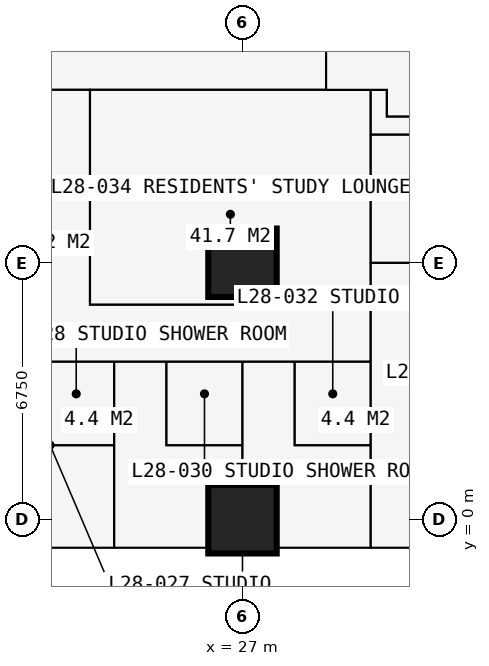
"""IFC4 building model, lengths in metres.
Left out: names, types, materials, properties, quantities, classifications, styles, units other than length and angle.
Written with IfcOpenShell. Run it as: python <this file> out.ifc"""

import sys

from ifc_helpers import new_model, si_unit, direction, frame, frame_2d, origin, origin_2d, place, context, subcontext, project, spatial, rectangle, extrude, element, fill, save


model = new_model("IFC4")
c1 = context("Model", 3, precision=1e-05, world=origin(), true_north=direction((0.0, 1.0)))
c2 = subcontext(c1, "Body", "Model", "MODEL_VIEW")
j1 = project(units=[si_unit("LENGTHUNIT", "METRE"), si_unit("PLANEANGLEUNIT", "RADIAN")], contexts=[c1])
p1 = place(None, origin())
s1 = spatial("IfcSite", under=j1, at=p1, CompositionType="ELEMENT")
p2 = place(p1, origin())
s2 = spatial("IfcBuilding", under=s1, at=p2, CompositionType="ELEMENT")
p3 = place(p2, frame((0.0, 0.0, 105.3)))
s3 = spatial("IfcBuildingStorey", under=s2, at=p3, CompositionType="ELEMENT", Elevation=105.3)
for number, where, z_axis, x_axis in (
    (1, (27.0, 0.0, 0.0), (0.0, 0.0, 1.0), (1.0, 0.0, 0.0)),
    (2, (27.0, 6.75, 0.0), (0.0, 0.0, 1.0), (1.0, 0.0, 0.0)),
):
    element("IfcColumn", number, at=place(p3, frame(where, z_axis=z_axis, x_axis=x_axis)), inside=s3, PredefinedType="COLUMN", context=c2, shape_type="SweptSolid", body=[
        extrude(rectangle(XDim=1.8, YDim=1.8, at=origin_2d()), origin(), (0.0, 0.0, 1.0), 3.6),
    ])
p4 = place(p3, frame((27.0, -0.75, 0.0), z_axis=(0.0, 0.0, 1.0), x_axis=(-1.0, 0.0, 0.0)))
e3 = element("IfcWall", 3, at=p4, inside=s3, PredefinedType="SOLIDWALL", context=c2, shape_type="SweptSolid", body=[
    extrude(rectangle(XDim=6.75, YDim=0.15, at=frame_2d((3.375, 0.0))), origin(), (0.0, 0.0, 1.0), 3.375),
])
p5 = place(p4, frame((0.962, 0.0, 0.0)))
e4 = element("IfcOpeningElement", 4, at=p5, cuts=e3, PredefinedType="OPENING", context=c2, shape_type="SweptSolid", body=[
    extrude(rectangle(XDim=1.0, YDim=2.2, at=frame_2d((0.5, 1.1))), frame((0.0, 0.085, 0.0), z_axis=(0.0, -1.0, 0.0), x_axis=(1.0, 0.0, 0.0)), (0.0, 0.0, 1.0), 0.17),
])
p6 = place(p4, frame((2.025, 0.0, 0.9)))
e5 = element("IfcOpeningElement", 5, at=p6, cuts=e3, PredefinedType="OPENING", context=c2, shape_type="SweptSolid", body=[
    extrude(rectangle(XDim=1.2, YDim=1.8, at=frame_2d((0.6, 0.9))), frame((0.0, 0.085, 0.0), z_axis=(0.0, -1.0, 0.0), x_axis=(1.0, 0.0, 0.0)), (0.0, 0.0, 1.0), 0.17),
])
p7 = place(p4, frame((4.788, 0.0, 0.0)))
e6 = element("IfcOpeningElement", 6, at=p7, cuts=e3, PredefinedType="OPENING", context=c2, shape_type="SweptSolid", body=[
    extrude(rectangle(XDim=1.0, YDim=2.2, at=frame_2d((0.5, 1.1))), frame((0.0, 0.085, 0.0), z_axis=(0.0, -1.0, 0.0), x_axis=(1.0, 0.0, 0.0)), (0.0, 0.0, 1.0), 0.17),
])
p8 = place(p4, frame((3.525, 0.0, 0.9)))
e7 = element("IfcOpeningElement", 7, at=p8, cuts=e3, PredefinedType="OPENING", context=c2, shape_type="SweptSolid", body=[
    extrude(rectangle(XDim=1.2, YDim=1.8, at=frame_2d((0.6, 0.9))), frame((0.0, 0.085, 0.0), z_axis=(0.0, -1.0, 0.0), x_axis=(1.0, 0.0, 0.0)), (0.0, 0.0, 1.0), 0.17),
])
p9 = place(p3, frame((23.625, -0.85, 0.0), z_axis=(0.0, 0.0, 1.0), x_axis=(0.0, -1.0, 0.0)))
e8 = element("IfcWall", 8, at=p9, inside=s3, PredefinedType="USERDEFINED", context=c2, shape_type="SweptSolid", body=[
    extrude(rectangle(XDim=2.2, YDim=1.0, at=frame_2d((1.1, 0.0))), origin(), (0.0, 0.0, 1.0), 0.9),
])
p10 = place(p3, frame((6.75, 4.15, 0.0), z_axis=(0.0, 0.0, 1.0), x_axis=(1.0, 0.0, 0.0)))
e9 = element("IfcWall", 9, at=p10, inside=s3, PredefinedType="PARTITIONING", context=c2, shape_type="SweptSolid", body=[
    extrude(rectangle(XDim=23.625, YDim=0.1, at=frame_2d((11.812, 0.0))), origin(), (0.0, 0.0, 1.0), 3.375),
])
p11 = place(p10, frame((0.2, 0.0, 0.0)))
e10 = element("IfcOpeningElement", 10, at=p11, cuts=e9, PredefinedType="OPENING", context=c2, shape_type="SweptSolid", body=[
    extrude(rectangle(XDim=0.95, YDim=2.2, at=frame_2d((0.475, 1.1))), frame((0.0, 0.06, 0.0), z_axis=(0.0, -1.0, 0.0), x_axis=(1.0, 0.0, 0.0)), (0.0, 0.0, 1.0), 0.12),
])
p12 = place(p10, frame((3.625, 0.0, 0.0)))
e11 = element("IfcOpeningElement", 11, at=p12, cuts=e9, PredefinedType="OPENING", context=c2, shape_type="SweptSolid", body=[
    extrude(rectangle(XDim=0.95, YDim=2.2, at=frame_2d((0.475, 1.1))), frame((0.0, 0.06, 0.0), z_axis=(0.0, -1.0, 0.0), x_axis=(1.0, 0.0, 0.0)), (0.0, 0.0, 1.0), 0.12),
])
p13 = place(p10, frame((6.95, 0.0, 0.0)))
e12 = element("IfcOpeningElement", 12, at=p13, cuts=e9, PredefinedType="OPENING", context=c2, shape_type="SweptSolid", body=[
    extrude(rectangle(XDim=0.95, YDim=2.2, at=frame_2d((0.475, 1.1))), frame((0.0, 0.06, 0.0), z_axis=(0.0, -1.0, 0.0), x_axis=(1.0, 0.0, 0.0)), (0.0, 0.0, 1.0), 0.12),
])
p14 = place(p10, frame((10.375, 0.0, 0.0)))
e13 = element("IfcOpeningElement", 13, at=p14, cuts=e9, PredefinedType="OPENING", context=c2, shape_type="SweptSolid", body=[
    extrude(rectangle(XDim=0.95, YDim=2.2, at=frame_2d((0.475, 1.1))), frame((0.0, 0.06, 0.0), z_axis=(0.0, -1.0, 0.0), x_axis=(1.0, 0.0, 0.0)), (0.0, 0.0, 1.0), 0.12),
])
p15 = place(p10, frame((13.75, 0.0, 0.0)))
e14 = element("IfcOpeningElement", 14, at=p15, cuts=e9, PredefinedType="OPENING", context=c2, shape_type="SweptSolid", body=[
    extrude(rectangle(XDim=0.95, YDim=2.2, at=frame_2d((0.475, 1.1))), frame((0.0, 0.06, 0.0), z_axis=(0.0, -1.0, 0.0), x_axis=(1.0, 0.0, 0.0)), (0.0, 0.0, 1.0), 0.12),
])
p16 = place(p10, frame((17.125, 0.0, 0.0)))
e15 = element("IfcOpeningElement", 15, at=p16, cuts=e9, PredefinedType="OPENING", context=c2, shape_type="SweptSolid", body=[
    extrude(rectangle(XDim=0.95, YDim=2.2, at=frame_2d((0.475, 1.1))), frame((0.0, 0.06, 0.0), z_axis=(0.0, -1.0, 0.0), x_axis=(1.0, 0.0, 0.0)), (0.0, 0.0, 1.0), 0.12),
])
p17 = place(p10, frame((20.5, 0.0, 0.0)))
e16 = element("IfcOpeningElement", 16, at=p17, cuts=e9, PredefinedType="OPENING", context=c2, shape_type="SweptSolid", body=[
    extrude(rectangle(XDim=0.95, YDim=2.2, at=frame_2d((0.475, 1.1))), frame((0.0, 0.06, 0.0), z_axis=(0.0, -1.0, 0.0), x_axis=(1.0, 0.0, 0.0)), (0.0, 0.0, 1.0), 0.12),
])
p18 = place(p3, frame((10.125, 11.3, 0.0), z_axis=(0.0, 0.0, 1.0), x_axis=(1.0, 0.0, 0.0)))
e17 = element("IfcWall", 17, at=p18, inside=s3, PredefinedType="PARTITIONING", context=c2, shape_type="SweptSolid", body=[
    extrude(rectangle(XDim=20.675, YDim=0.15, at=frame_2d((10.337, 0.0))), origin(), (0.0, 0.0, 1.0), 3.375),
])
p19 = place(p18, frame((1.775, 0.0, 0.0)))
e18 = element("IfcOpeningElement", 18, at=p19, cuts=e17, PredefinedType="OPENING", context=c2, shape_type="SweptSolid", body=[
    extrude(rectangle(XDim=1.0, YDim=2.2, at=frame_2d((0.5, 1.1))), frame((0.0, 0.085, 0.0), z_axis=(0.0, -1.0, 0.0), x_axis=(1.0, 0.0, 0.0)), (0.0, 0.0, 1.0), 0.17),
])
p20 = place(p18, frame((11.312, 0.0, 0.0)))
e19 = element("IfcOpeningElement", 19, at=p20, cuts=e17, PredefinedType="OPENING", context=c2, shape_type="SweptSolid", body=[
    extrude(rectangle(XDim=1.0, YDim=2.2, at=frame_2d((0.5, 1.1))), frame((0.0, 0.085, 0.0), z_axis=(0.0, -1.0, 0.0), x_axis=(1.0, 0.0, 0.0)), (0.0, 0.0, 1.0), 0.17),
])
p21 = place(p3, frame((21.625, 1.95, 0.0), z_axis=(0.0, 0.0, 1.0), x_axis=(1.0, 0.0, 0.0)))
e20 = element("IfcWall", 20, at=p21, inside=s3, PredefinedType="PARTITIONING", context=c2, shape_type="SweptSolid", body=[
    extrude(rectangle(XDim=2.0, YDim=0.1, at=frame_2d((1.0, 0.0))), origin(), (0.0, 0.0, 1.0), 3.375),
])
p22 = place(p3, frame((22.988, 5.65, 0.0), z_axis=(0.0, 0.0, 1.0), x_axis=(1.0, 0.0, 0.0)))
e21 = element("IfcWall", 21, at=p22, inside=s3, PredefinedType="PARTITIONING", context=c2, shape_type="SweptSolid", body=[
    extrude(rectangle(XDim=7.387, YDim=0.15, at=frame_2d((3.694, 0.0))), origin(), (0.0, 0.0, 1.0), 3.375),
])
p23 = place(p22, frame((2.15, 0.0, 0.0)))
e22 = element("IfcOpeningElement", 22, at=p23, cuts=e21, PredefinedType="OPENING", context=c2, shape_type="SweptSolid", body=[
    extrude(rectangle(XDim=0.95, YDim=2.2, at=frame_2d((0.475, 1.1))), frame((0.0, 0.085, 0.0), z_axis=(0.0, -1.0, 0.0), x_axis=(1.0, 0.0, 0.0)), (0.0, 0.0, 1.0), 0.17),
])
p24 = place(p3, frame((22.988, 5.65, 0.0), z_axis=(0.0, 0.0, 1.0), x_axis=(0.0, 1.0, 0.0)))
e23 = element("IfcWall", 23, at=p24, inside=s3, PredefinedType="PARTITIONING", context=c2, shape_type="SweptSolid", body=[
    extrude(rectangle(XDim=5.65, YDim=0.15, at=frame_2d((2.825, 0.0))), origin(), (0.0, 0.0, 1.0), 3.375),
])
p25 = place(p3, frame((23.625, -0.734, 0.0), z_axis=(0.0, 0.0, 1.0), x_axis=(0.0, 1.0, 0.0)))
e24 = element("IfcWall", 24, at=p25, inside=s3, PredefinedType="PARTITIONING", context=c2, shape_type="SweptSolid", body=[
    extrude(rectangle(XDim=4.884, YDim=0.175, at=frame_2d((2.442, 0.0))), origin(), (0.0, 0.0, 1.0), 3.375),
])
p26 = place(p3, frame((25.0, 1.95, 0.0), z_axis=(0.0, 0.0, 1.0), x_axis=(0.0, 1.0, 0.0)))
e25 = element("IfcWall", 25, at=p26, inside=s3, PredefinedType="PARTITIONING", context=c2, shape_type="SweptSolid", body=[
    extrude(rectangle(XDim=2.2, YDim=0.1, at=frame_2d((1.1, 0.0))), origin(), (0.0, 0.0, 1.0), 3.375),
])
p27 = place(p26, frame((0.65, 0.0, 0.0)))
e26 = element("IfcOpeningElement", 26, at=p27, cuts=e25, PredefinedType="OPENING", context=c2, shape_type="SweptSolid", body=[
    extrude(rectangle(XDim=0.9, YDim=2.2, at=frame_2d((0.45, 1.1))), frame((0.0, 0.06, 0.0), z_axis=(0.0, -1.0, 0.0), x_axis=(1.0, 0.0, 0.0)), (0.0, 0.0, 1.0), 0.12),
])
p28 = place(p3, frame((25.0, 1.95, 0.0), z_axis=(0.0, 0.0, 1.0), x_axis=(1.0, 0.0, 0.0)))
e27 = element("IfcWall", 27, at=p28, inside=s3, PredefinedType="PARTITIONING", context=c2, shape_type="SweptSolid", body=[
    extrude(rectangle(XDim=2.0, YDim=0.1, at=frame_2d((1.0, 0.0))), origin(), (0.0, 0.0, 1.0), 3.375),
])
p29 = place(p3, frame((27.0, -0.734, 0.0), z_axis=(0.0, 0.0, 1.0), x_axis=(0.0, 1.0, 0.0)))
e28 = element("IfcWall", 28, at=p29, inside=s3, PredefinedType="PARTITIONING", context=c2, shape_type="SweptSolid", body=[
    extrude(rectangle(XDim=4.884, YDim=0.175, at=frame_2d((2.442, 0.0))), origin(), (0.0, 0.0, 1.0), 2.61),
])
p30 = place(p3, frame((28.375, 1.95, 0.0), z_axis=(0.0, 0.0, 1.0), x_axis=(0.0, 1.0, 0.0)))
e29 = element("IfcWall", 29, at=p30, inside=s3, PredefinedType="PARTITIONING", context=c2, shape_type="SweptSolid", body=[
    extrude(rectangle(XDim=2.2, YDim=0.1, at=frame_2d((1.1, 0.0))), origin(), (0.0, 0.0, 1.0), 3.375),
])
p31 = place(p30, frame((0.65, 0.0, 0.0)))
e30 = element("IfcOpeningElement", 30, at=p31, cuts=e29, PredefinedType="OPENING", context=c2, shape_type="SweptSolid", body=[
    extrude(rectangle(XDim=0.9, YDim=2.2, at=frame_2d((0.45, 1.1))), frame((0.0, 0.06, 0.0), z_axis=(0.0, -1.0, 0.0), x_axis=(1.0, 0.0, 0.0)), (0.0, 0.0, 1.0), 0.12),
])
p32 = place(p3, frame((28.375, 1.95, 0.0), z_axis=(0.0, 0.0, 1.0), x_axis=(1.0, 0.0, 0.0)))
e31 = element("IfcWall", 31, at=p32, inside=s3, PredefinedType="PARTITIONING", context=c2, shape_type="SweptSolid", body=[
    extrude(rectangle(XDim=2.0, YDim=0.1, at=frame_2d((1.0, 0.0))), origin(), (0.0, 0.0, 1.0), 3.375),
])
p33 = place(p3, frame((29.2, 11.3, 0.0), z_axis=(0.0, 0.0, 1.0), x_axis=(0.0, 1.0, 0.0)))
e32 = element("IfcWall", 32, at=p33, inside=s3, PredefinedType="PARTITIONING", context=c2, shape_type="SweptSolid", body=[
    extrude(rectangle(XDim=17.9, YDim=0.2, at=frame_2d((8.95, 0.0))), origin(), (0.0, 0.0, 1.0), 3.375),
])
p34 = place(p33, frame((8.35, 0.0, 0.0)))
e33 = element("IfcOpeningElement", 33, at=p34, cuts=e32, PredefinedType="OPENING", context=c2, shape_type="SweptSolid", body=[
    extrude(rectangle(XDim=1.2, YDim=2.2, at=frame_2d((0.6, 1.1))), frame((0.0, 0.11, 0.0), z_axis=(0.0, -1.0, 0.0), x_axis=(1.0, 0.0, 0.0)), (0.0, 0.0, 1.0), 0.22),
])
p35 = place(p3, frame((30.375, -0.734, 0.0), z_axis=(0.0, 0.0, 1.0), x_axis=(0.0, 1.0, 0.0)))
e34 = element("IfcWall", 34, at=p35, inside=s3, PredefinedType="PARTITIONING", context=c2, shape_type="SweptSolid", body=[
    extrude(rectangle(XDim=12.034, YDim=0.15, at=frame_2d((6.017, 0.0))), origin(), (0.0, 0.0, 1.0), 3.375),
])
p36 = place(p3, frame((30.375, 6.75, 0.0), z_axis=(0.0, 0.0, 1.0), x_axis=(1.0, 0.0, 0.0)))
e35 = element("IfcWall", 35, at=p36, inside=s3, PredefinedType="PARTITIONING", context=c2, shape_type="SweptSolid", body=[
    extrude(rectangle(XDim=10.859, YDim=0.15, at=frame_2d((5.429, 0.0))), origin(), (0.0, 0.0, 1.0), 2.877),
])
p37 = place(p36, frame((1.45, 0.0, 0.0)))
e36 = element("IfcOpeningElement", 36, at=p37, cuts=e35, PredefinedType="OPENING", context=c2, shape_type="SweptSolid", body=[
    extrude(rectangle(XDim=1.0, YDim=2.2, at=frame_2d((0.5, 1.1))), frame((0.0, 0.085, 0.0), z_axis=(0.0, -1.0, 0.0), x_axis=(1.0, 0.0, 0.0)), (0.0, 0.0, 1.0), 0.17),
])
p38 = place(p3, frame((30.375, 10.125, 0.0), z_axis=(0.0, 0.0, 1.0), x_axis=(1.0, 0.0, 0.0)))
e37 = element("IfcWall", 37, at=p38, inside=s3, PredefinedType="PARTITIONING", context=c2, shape_type="SweptSolid", body=[
    extrude(rectangle(XDim=10.859, YDim=0.15, at=frame_2d((5.429, 0.0))), origin(), (0.0, 0.0, 1.0), 3.375),
])
p39 = place(p38, frame((2.5, 0.0, 0.0)))
e38 = element("IfcOpeningElement", 38, at=p39, cuts=e37, PredefinedType="OPENING", context=c2, shape_type="SweptSolid", body=[
    extrude(rectangle(XDim=1.0, YDim=2.2, at=frame_2d((0.5, 1.1))), frame((0.0, 0.085, 0.0), z_axis=(0.0, -1.0, 0.0), x_axis=(1.0, 0.0, 0.0)), (0.0, 0.0, 1.0), 0.17),
])
p40 = place(p3, frame((30.8, 10.6, 0.0), z_axis=(0.0, 0.0, 1.0), x_axis=(0.0, 1.0, 0.0)))
e39 = element("IfcWall", 39, at=p40, inside=s3, PredefinedType="PARTITIONING", context=c2, shape_type="SweptSolid", body=[
    extrude(rectangle(XDim=0.7, YDim=0.15, at=frame_2d((0.35, 0.0))), origin(), (0.0, 0.0, 1.0), 3.375),
])
p41 = place(p3, frame((30.8, 10.6, 0.0), z_axis=(0.0, 0.0, 1.0), x_axis=(1.0, 0.0, 0.0)))
e40 = element("IfcWall", 40, at=p41, inside=s3, PredefinedType="PARTITIONING", context=c2, shape_type="SweptSolid", body=[
    extrude(rectangle(XDim=1.85, YDim=0.15, at=frame_2d((0.925, 0.0))), origin(), (0.0, 0.0, 1.0), 3.375),
])
p42 = place(p5, origin())
e41 = element("IfcDoor", 41, at=p42, inside=s3, OperationType="SINGLE_SWING_LEFT", PredefinedType="DOOR", context=c2, shape_type="SweptSolid", body=[
    extrude(rectangle(XDim=1.0, YDim=2.2, at=frame_2d((0.5, 1.1))), frame((0.0, 0.025, 0.0), z_axis=(0.0, -1.0, 0.0), x_axis=(1.0, 0.0, 0.0)), (0.0, 0.0, 1.0), 0.05),
])
fill(e4, e41)
p43 = place(p6, origin())
e42 = element("IfcWindow", 42, at=p43, inside=s3, PartitioningType="SINGLE_PANEL", PredefinedType="WINDOW", context=c2, shape_type="SweptSolid", body=[
    extrude(rectangle(XDim=1.2, YDim=1.8, at=frame_2d((0.6, 0.9))), frame((0.0, 0.03, 0.0), z_axis=(0.0, -1.0, 0.0), x_axis=(1.0, 0.0, 0.0)), (0.0, 0.0, 1.0), 0.06),
])
fill(e5, e42)
p44 = place(p7, origin())
e43 = element("IfcDoor", 43, at=p44, inside=s3, OperationType="SINGLE_SWING_RIGHT", PredefinedType="DOOR", context=c2, shape_type="SweptSolid", body=[
    extrude(rectangle(XDim=1.0, YDim=2.2, at=frame_2d((0.5, 1.1))), frame((0.0, 0.025, 0.0), z_axis=(0.0, -1.0, 0.0), x_axis=(1.0, 0.0, 0.0)), (0.0, 0.0, 1.0), 0.05),
])
fill(e6, e43)
p45 = place(p8, origin())
e44 = element("IfcWindow", 44, at=p45, inside=s3, PartitioningType="SINGLE_PANEL", PredefinedType="WINDOW", context=c2, shape_type="SweptSolid", body=[
    extrude(rectangle(XDim=1.2, YDim=1.8, at=frame_2d((0.6, 0.9))), frame((0.0, 0.03, 0.0), z_axis=(0.0, -1.0, 0.0), x_axis=(1.0, 0.0, 0.0)), (0.0, 0.0, 1.0), 0.06),
])
fill(e7, e44)
p46 = place(p16, origin())
e45 = element("IfcDoor", 45, at=p46, inside=s3, OperationType="SINGLE_SWING_LEFT", PredefinedType="DOOR", context=c2, shape_type="SweptSolid", body=[
    extrude(rectangle(XDim=0.95, YDim=2.2, at=frame_2d((0.475, 1.1))), frame((0.0, 0.025, 0.0), z_axis=(0.0, -1.0, 0.0), x_axis=(1.0, 0.0, 0.0)), (0.0, 0.0, 1.0), 0.05),
])
fill(e15, e45)
p47 = place(p27, origin())
e46 = element("IfcDoor", 46, at=p47, inside=s3, OperationType="SINGLE_SWING_RIGHT", PredefinedType="DOOR", context=c2, shape_type="SweptSolid", body=[
    extrude(rectangle(XDim=0.9, YDim=2.2, at=frame_2d((0.45, 1.1))), frame((0.0, 0.025, 0.0), z_axis=(0.0, -1.0, 0.0), x_axis=(1.0, 0.0, 0.0)), (0.0, 0.0, 1.0), 0.05),
])
fill(e26, e46)
p48 = place(p17, origin())
e47 = element("IfcDoor", 47, at=p48, inside=s3, OperationType="SINGLE_SWING_LEFT", PredefinedType="DOOR", context=c2, shape_type="SweptSolid", body=[
    extrude(rectangle(XDim=0.95, YDim=2.2, at=frame_2d((0.475, 1.1))), frame((0.0, 0.025, 0.0), z_axis=(0.0, -1.0, 0.0), x_axis=(1.0, 0.0, 0.0)), (0.0, 0.0, 1.0), 0.05),
])
fill(e16, e47)
p49 = place(p31, origin())
e48 = element("IfcDoor", 48, at=p49, inside=s3, OperationType="SINGLE_SWING_RIGHT", PredefinedType="DOOR", context=c2, shape_type="SweptSolid", body=[
    extrude(rectangle(XDim=0.9, YDim=2.2, at=frame_2d((0.45, 1.1))), frame((0.0, 0.025, 0.0), z_axis=(0.0, -1.0, 0.0), x_axis=(1.0, 0.0, 0.0)), (0.0, 0.0, 1.0), 0.05),
])
fill(e30, e48)
p50 = place(p20, origin())
e49 = element("IfcDoor", 49, at=p50, inside=s3, OperationType="SINGLE_SWING_LEFT", PredefinedType="DOOR", context=c2, shape_type="SweptSolid", body=[
    extrude(rectangle(XDim=1.0, YDim=2.2, at=frame_2d((0.5, 1.1))), frame((0.0, 0.025, 0.0), z_axis=(0.0, -1.0, 0.0), x_axis=(1.0, 0.0, 0.0)), (0.0, 0.0, 1.0), 0.05),
])
fill(e19, e49)
p51 = place(p23, origin())
e50 = element("IfcDoor", 50, at=p51, inside=s3, OperationType="SINGLE_SWING_LEFT", PredefinedType="DOOR", context=c2, shape_type="SweptSolid", body=[
    extrude(rectangle(XDim=0.95, YDim=2.2, at=frame_2d((0.475, 1.1))), frame((0.0, 0.025, 0.0), z_axis=(0.0, -1.0, 0.0), x_axis=(1.0, 0.0, 0.0)), (0.0, 0.0, 1.0), 0.05),
])
fill(e22, e50)
save(model, sys.argv[1])
